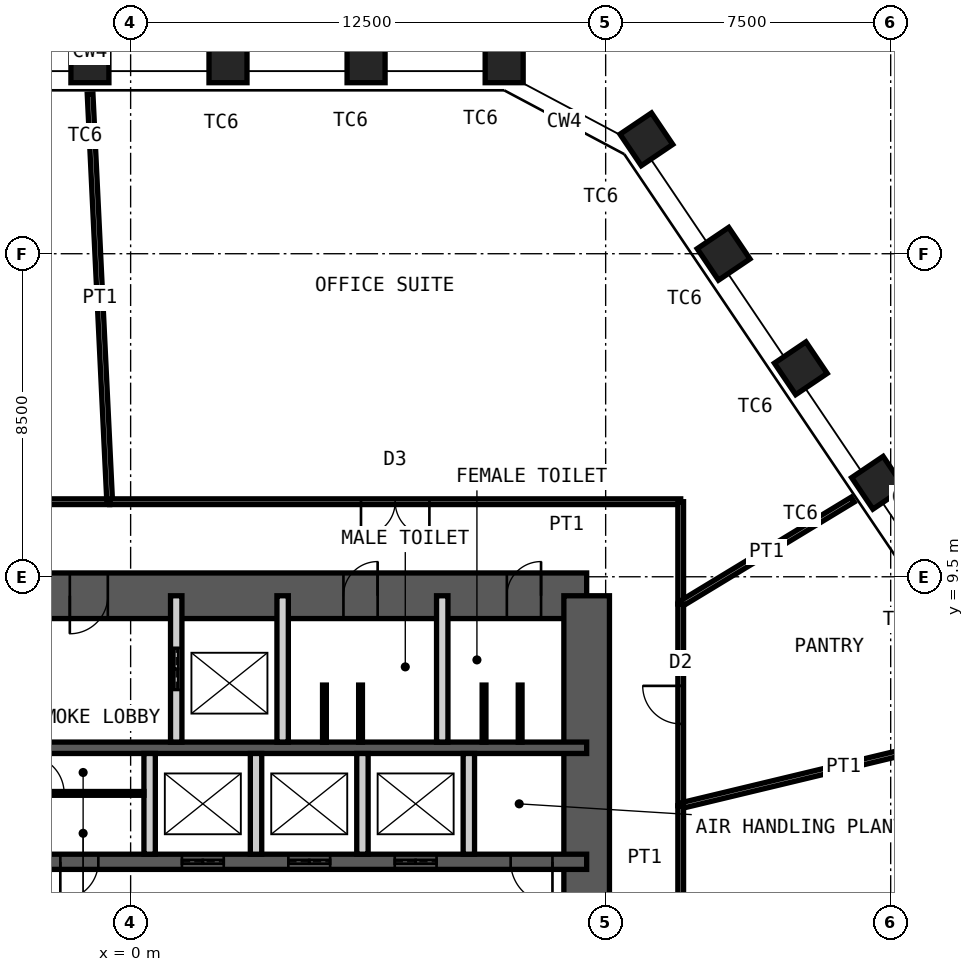
"""IFC4 building model, lengths in metres.
Left out: names, types, materials, properties, quantities, classifications, styles, units other than length and angle.
Written with IfcOpenShell. Run it as: python <this file> out.ifc"""

import sys

from ifc_helpers import new_model, si_unit, direction, frame, frame_2d, origin, origin_2d, place, context, subcontext, project, spatial, rectangle, hollow_rectangle, extrude, element, fill, save


model = new_model("IFC4")
c1 = context("Model", 3, precision=1e-05, world=origin(), true_north=direction((0.0, 1.0)))
c2 = subcontext(c1, "Body", "Model", "MODEL_VIEW")
j1 = project(units=[si_unit("LENGTHUNIT", "METRE"), si_unit("PLANEANGLEUNIT", "RADIAN")], contexts=[c1])
p1 = place(None, origin())
s1 = spatial("IfcSite", under=j1, at=p1, CompositionType="ELEMENT")
p2 = place(p1, origin())
s2 = spatial("IfcBuilding", under=s1, at=p2, CompositionType="ELEMENT")
p3 = place(p2, frame((0.0, 0.0, 226.6)))
s3 = spatial("IfcBuildingStorey", under=s2, at=p3, CompositionType="ELEMENT", Elevation=226.6)
for number, where, z_axis, x_axis in (
    (1, (-1.071, 23.0, 0.0), (0.0, 0.0, 1.0), (-1.0, 0.0, 0.0)),
    (2, (2.562, 23.0, 0.0), (0.0, 0.0, 1.0), (-1.0, 0.0, 0.0)),
    (3, (6.196, 23.0, 0.0), (0.0, 0.0, 1.0), (-1.0, 0.0, 0.0)),
    (4, (9.829, 23.0, 0.0), (0.0, 0.0, 1.0), (-1.0, 0.0, 0.0)),
    (5, (13.571, 21.01, 0.0), (0.0, 0.0, 1.0), (-0.559, 0.829, 0.0)),
    (6, (15.603, 17.998, 0.0), (0.0, 0.0, 1.0), (-0.559, 0.829, 0.0)),
    (7, (17.635, 14.986, 0.0), (0.0, 0.0, 1.0), (-0.559, 0.829, 0.0)),
    (8, (19.667, 11.973, 0.0), (0.0, 0.0, 1.0), (-0.559, 0.829, 0.0)),
):
    element("IfcColumn", number, at=place(p3, frame(where, z_axis=z_axis, x_axis=x_axis)), inside=s3, PredefinedType="COLUMN", context=c2, shape_type="SweptSolid", body=[
        extrude(hollow_rectangle(XDim=1.0, YDim=1.0, WallThickness=0.06, at=origin_2d()), origin(), (0.0, 0.0, 1.0), 4.2),
    ])
p4 = place(p3, frame((-12.0, 9.0, 0.0), z_axis=(0.0, 0.0, 1.0), x_axis=(1.0, 0.0, 0.0)))
e9 = element("IfcWall", 9, at=p4, inside=s3, PredefinedType="SHEAR", context=c2, shape_type="SweptSolid", body=[
    extrude(rectangle(XDim=24.0, YDim=1.2, at=frame_2d((12.0, 0.0))), origin(), (0.0, 0.0, 1.0), 4.2),
])
p5 = place(p4, frame((10.4, 0.0, 0.0)))
e10 = element("IfcOpeningElement", 10, at=p5, cuts=e9, PredefinedType="OPENING", context=c2, shape_type="SweptSolid", body=[
    extrude(rectangle(XDim=1.0, YDim=2.1, at=frame_2d((0.5, 1.05))), frame((0.0, 0.61, 0.0), z_axis=(0.0, -1.0, 0.0), x_axis=(1.0, 0.0, 0.0)), (0.0, 0.0, 1.0), 1.22),
])
p6 = place(p4, frame((17.6, 0.0, 0.0)))
e11 = element("IfcOpeningElement", 11, at=p6, cuts=e9, PredefinedType="OPENING", context=c2, shape_type="SweptSolid", body=[
    extrude(rectangle(XDim=0.9, YDim=2.1, at=frame_2d((0.45, 1.05))), frame((0.0, 0.61, 0.0), z_axis=(0.0, -1.0, 0.0), x_axis=(1.0, 0.0, 0.0)), (0.0, 0.0, 1.0), 1.22),
])
p7 = place(p4, frame((21.9, 0.0, 0.0)))
e12 = element("IfcOpeningElement", 12, at=p7, cuts=e9, PredefinedType="OPENING", context=c2, shape_type="SweptSolid", body=[
    extrude(rectangle(XDim=0.9, YDim=2.1, at=frame_2d((0.45, 1.05))), frame((0.0, 0.61, 0.0), z_axis=(0.0, -1.0, 0.0), x_axis=(1.0, 0.0, 0.0)), (0.0, 0.0, 1.0), 1.22),
])
p8 = place(p3, frame((12.0, -9.0, 0.0), z_axis=(0.0, 0.0, 1.0), x_axis=(0.0, 1.0, 0.0)))
e13 = element("IfcWall", 13, at=p8, inside=s3, PredefinedType="SHEAR", context=c2, shape_type="SweptSolid", body=[
    extrude(rectangle(XDim=18.0, YDim=1.2, at=frame_2d((9.0, 0.0))), origin(), (0.0, 0.0, 1.0), 4.2),
])
p9 = place(p8, frame((8.1, 0.0, 0.0)))
e14 = element("IfcOpeningElement", 14, at=p9, cuts=e13, PredefinedType="OPENING", context=c2, shape_type="SweptSolid", body=[
    extrude(rectangle(XDim=1.8, YDim=2.1, at=frame_2d((0.9, 1.05))), frame((0.0, 0.61, 0.0), z_axis=(0.0, -1.0, 0.0), x_axis=(1.0, 0.0, 0.0)), (0.0, 0.0, 1.0), 1.22),
])
p10 = place(p3, frame((-12.0, 5.0, 0.0), z_axis=(0.0, 0.0, 1.0), x_axis=(1.0, 0.0, 0.0)))
e15 = element("IfcWall", 15, at=p10, inside=s3, PredefinedType="SHEAR", context=c2, shape_type="SweptSolid", body=[
    extrude(rectangle(XDim=24.0, YDim=0.3, at=frame_2d((12.0, 0.0))), origin(), (0.0, 0.0, 1.0), 4.2),
])
p11 = place(p3, frame((-12.0, 2.0, 0.0), z_axis=(0.0, 0.0, 1.0), x_axis=(1.0, 0.0, 0.0)))
e16 = element("IfcWall", 16, at=p11, inside=s3, PredefinedType="SHEAR", context=c2, shape_type="SweptSolid", body=[
    extrude(rectangle(XDim=24.0, YDim=0.4, at=frame_2d((12.0, 0.0))), origin(), (0.0, 0.0, 1.0), 4.2),
])
p12 = place(p11, frame((2.4, 0.0, 0.0)))
e17 = element("IfcOpeningElement", 17, at=p12, cuts=e16, PredefinedType="OPENING", context=c2, shape_type="SweptSolid", body=[
    extrude(rectangle(XDim=1.1, YDim=2.1, at=frame_2d((0.55, 1.05))), frame((0.0, 0.21, 0.0), z_axis=(0.0, -1.0, 0.0), x_axis=(1.0, 0.0, 0.0)), (0.0, 0.0, 1.0), 0.42),
])
p13 = place(p11, frame((22.0, 0.0, 0.0)))
e18 = element("IfcOpeningElement", 18, at=p13, cuts=e16, PredefinedType="OPENING", context=c2, shape_type="SweptSolid", body=[
    extrude(rectangle(XDim=1.1, YDim=2.1, at=frame_2d((0.55, 1.05))), frame((0.0, 0.21, 0.0), z_axis=(0.0, -1.0, 0.0), x_axis=(1.0, 0.0, 0.0)), (0.0, 0.0, 1.0), 0.42),
])
p14 = place(p11, frame((10.15, 0.0, 0.0)))
e19 = element("IfcOpeningElement", 19, at=p14, cuts=e16, PredefinedType="OPENING", context=c2, shape_type="SweptSolid", body=[
    extrude(rectangle(XDim=1.0, YDim=2.1, at=frame_2d((0.5, 1.05))), frame((0.0, 0.21, 0.0), z_axis=(0.0, -1.0, 0.0), x_axis=(1.0, 0.0, 0.0)), (0.0, 0.0, 1.0), 0.42),
])
p15 = place(p11, frame((6.9, 0.0, 0.0)))
e20 = element("IfcOpeningElement", 20, at=p15, cuts=e16, PredefinedType="OPENING", context=c2, shape_type="SweptSolid", body=[
    extrude(rectangle(XDim=1.0, YDim=2.1, at=frame_2d((0.5, 1.05))), frame((0.0, 0.21, 0.0), z_axis=(0.0, -1.0, 0.0), x_axis=(1.0, 0.0, 0.0)), (0.0, 0.0, 1.0), 0.42),
])
p16 = place(p11, frame((13.35, 0.0, 0.0)))
e21 = element("IfcOpeningElement", 21, at=p16, cuts=e16, PredefinedType="OPENING", context=c2, shape_type="SweptSolid", body=[
    extrude(rectangle(XDim=1.1, YDim=2.4, at=frame_2d((0.55, 1.2))), frame((0.0, 0.21, 0.0), z_axis=(0.0, -1.0, 0.0), x_axis=(1.0, 0.0, 0.0)), (0.0, 0.0, 1.0), 0.42),
])
p17 = place(p11, frame((16.15, 0.0, 0.0)))
e22 = element("IfcOpeningElement", 22, at=p17, cuts=e16, PredefinedType="OPENING", context=c2, shape_type="SweptSolid", body=[
    extrude(rectangle(XDim=1.1, YDim=2.4, at=frame_2d((0.55, 1.2))), frame((0.0, 0.21, 0.0), z_axis=(0.0, -1.0, 0.0), x_axis=(1.0, 0.0, 0.0)), (0.0, 0.0, 1.0), 0.42),
])
p18 = place(p11, frame((18.95, 0.0, 0.0)))
e23 = element("IfcOpeningElement", 23, at=p18, cuts=e16, PredefinedType="OPENING", context=c2, shape_type="SweptSolid", body=[
    extrude(rectangle(XDim=1.1, YDim=2.4, at=frame_2d((0.55, 1.2))), frame((0.0, 0.21, 0.0), z_axis=(0.0, -1.0, 0.0), x_axis=(1.0, 0.0, 0.0)), (0.0, 0.0, 1.0), 0.42),
])
p19 = place(p3, frame((1.2, 5.15, 0.0), z_axis=(0.0, 0.0, 1.0), x_axis=(0.0, 1.0, 0.0)))
e24 = element("IfcWall", 24, at=p19, inside=s3, PredefinedType="PARTITIONING", context=c2, shape_type="SweptSolid", body=[
    extrude(rectangle(XDim=3.85, YDim=0.3, at=frame_2d((1.925, 0.0))), origin(), (0.0, 0.0, 1.0), 3.98),
])
p20 = place(p19, frame((1.375, 0.0, 0.0)))
e25 = element("IfcOpeningElement", 25, at=p20, cuts=e24, PredefinedType="OPENING", context=c2, shape_type="SweptSolid", body=[
    extrude(rectangle(XDim=1.1, YDim=2.4, at=frame_2d((0.55, 1.2))), frame((0.0, 0.16, 0.0), z_axis=(0.0, -1.0, 0.0), x_axis=(1.0, 0.0, 0.0)), (0.0, 0.0, 1.0), 0.32),
])
for number, where, z_axis, x_axis in (
    (26, (4.0, 5.15, 0.0), (0.0, 0.0, 1.0), (0.0, 1.0, 0.0)),
    (27, (8.2, 5.15, 0.0), (0.0, 0.0, 1.0), (0.0, 1.0, 0.0)),
):
    element("IfcWall", number, at=place(p3, frame(where, z_axis=z_axis, x_axis=x_axis)), inside=s3, PredefinedType="PARTITIONING", context=c2, shape_type="SweptSolid", body=[
        extrude(rectangle(XDim=3.85, YDim=0.3, at=frame_2d((1.925, 0.0))), origin(), (0.0, 0.0, 1.0), 3.98),
    ])
for number, where, z_axis, x_axis in (
    (28, (0.5, 2.2, 0.0), (0.0, 0.0, 1.0), (0.0, 1.0, 0.0)),
    (29, (3.3, 2.2, 0.0), (0.0, 0.0, 1.0), (0.0, 1.0, 0.0)),
    (30, (6.1, 2.2, 0.0), (0.0, 0.0, 1.0), (0.0, 1.0, 0.0)),
    (31, (8.9, 2.2, 0.0), (0.0, 0.0, 1.0), (0.0, 1.0, 0.0)),
):
    element("IfcWall", number, at=place(p3, frame(where, z_axis=z_axis, x_axis=x_axis)), inside=s3, PredefinedType="PARTITIONING", context=c2, shape_type="SweptSolid", body=[
        extrude(rectangle(XDim=2.65, YDim=0.3, at=frame_2d((1.325, 0.0))), origin(), (0.0, 0.0, 1.0), 3.98),
    ])
p21 = place(p3, frame((-2.85, 3.8, 0.0), z_axis=(0.0, 0.0, 1.0), x_axis=(1.0, 0.0, 0.0)))
e32 = element("IfcWall", 32, at=p21, inside=s3, PredefinedType="PARTITIONING", context=c2, shape_type="SweptSolid", body=[
    extrude(rectangle(XDim=3.2, YDim=0.1, at=frame_2d((1.6, 0.0))), origin(), (0.0, 0.0, 1.0), 3.98),
])
p22 = place(p21, frame((0.1, 0.0, 0.0)))
e33 = element("IfcOpeningElement", 33, at=p22, cuts=e32, PredefinedType="OPENING", context=c2, shape_type="SweptSolid", body=[
    extrude(rectangle(XDim=1.0, YDim=2.4, at=frame_2d((0.5, 1.2))), frame((0.0, 0.06, 0.0), z_axis=(0.0, -1.0, 0.0), x_axis=(1.0, 0.0, 0.0)), (0.0, 0.0, 1.0), 0.12),
])
for number, where, z_axis, x_axis in (
    (34, (5.1, 5.15, 0.0), (0.0, 0.0, 1.0), (0.0, 1.0, 0.0)),
    (35, (6.05, 5.15, 0.0), (0.0, 0.0, 1.0), (0.0, 1.0, 0.0)),
    (36, (9.3, 5.15, 0.0), (0.0, 0.0, 1.0), (0.0, 1.0, 0.0)),
    (37, (10.25, 5.15, 0.0), (0.0, 0.0, 1.0), (0.0, 1.0, 0.0)),
):
    element("IfcWall", number, at=place(p3, frame(where, z_axis=z_axis, x_axis=x_axis)), inside=s3, PredefinedType="PARTITIONING", context=c2, shape_type="SweptSolid", body=[
        extrude(rectangle(XDim=1.5, YDim=0.1, at=frame_2d((0.75, 0.0))), origin(), (0.0, 0.0, 1.0), 2.1),
    ])
p23 = place(p3, frame((-8.267, 11.475, 0.0), z_axis=(0.0, 0.0, 1.0), x_axis=(1.0, 0.0, 0.0)))
e38 = element("IfcWall", 38, at=p23, inside=s3, PredefinedType="PARTITIONING", context=c2, shape_type="SweptSolid", body=[
    extrude(rectangle(XDim=7.716, YDim=0.15, at=frame_2d((3.858, 0.0))), origin(), (0.0, 0.0, 1.0), 4.03),
])
p24 = place(p23, frame((2.958, 0.0, 0.0)))
e39 = element("IfcOpeningElement", 39, at=p24, cuts=e38, PredefinedType="OPENING", context=c2, shape_type="SweptSolid", body=[
    extrude(rectangle(XDim=1.8, YDim=2.4, at=frame_2d((0.9, 1.2))), frame((0.0, 0.085, 0.0), z_axis=(0.0, -1.0, 0.0), x_axis=(1.0, 0.0, 0.0)), (0.0, 0.0, 1.0), 0.17),
])
p25 = place(p3, frame((-1.067, 22.2, 0.0), z_axis=(0.0, 0.0, 1.0), x_axis=(0.047998335863, -0.998847415652, 0.0)))
e40 = element("IfcWall", 40, at=p25, inside=s3, PredefinedType="PARTITIONING", context=c2, shape_type="SweptSolid", body=[
    extrude(rectangle(XDim=10.738, YDim=0.15, at=frame_2d((5.369, 0.0))), origin(), (0.0, 0.0, 1.0), 3.43),
])
p26 = place(p3, frame((-0.551, 11.475, 0.0), z_axis=(0.0, 0.0, 1.0), x_axis=(1.0, 0.0, 0.0)))
e41 = element("IfcWall", 41, at=p26, inside=s3, PredefinedType="PARTITIONING", context=c2, shape_type="SweptSolid", body=[
    extrude(rectangle(XDim=15.026, YDim=0.15, at=frame_2d((7.513, 0.0))), origin(), (0.0, 0.0, 1.0), 4.03),
])
p27 = place(p26, frame((6.613, 0.0, 0.0)))
e42 = element("IfcOpeningElement", 42, at=p27, cuts=e41, PredefinedType="OPENING", context=c2, shape_type="SweptSolid", body=[
    extrude(rectangle(XDim=1.8, YDim=2.4, at=frame_2d((0.9, 1.2))), frame((0.0, 0.085, 0.0), z_axis=(0.0, -1.0, 0.0), x_axis=(1.0, 0.0, 0.0)), (0.0, 0.0, 1.0), 0.17),
])
p28 = place(p3, frame((14.475, 11.475, 0.0), z_axis=(0.0, 0.0, 1.0), x_axis=(0.0, -1.0, 0.0)))
e43 = element("IfcWall", 43, at=p28, inside=s3, PredefinedType="PARTITIONING", context=c2, shape_type="SweptSolid", body=[
    extrude(rectangle(XDim=2.692, YDim=0.15, at=frame_2d((1.346, 0.0))), origin(), (0.0, 0.0, 1.0), 4.03),
])
p29 = place(p3, frame((19.001, 11.53, 0.0), z_axis=(0.0, 0.0, 1.0), x_axis=(-0.854906581035, -0.518781975114, 0.0)))
e44 = element("IfcWall", 44, at=p29, inside=s3, PredefinedType="PARTITIONING", context=c2, shape_type="SweptSolid", body=[
    extrude(rectangle(XDim=5.294, YDim=0.15, at=frame_2d((2.647, 0.0))), origin(), (0.0, 0.0, 1.0), 3.43),
])
p30 = place(p3, frame((14.475, 8.783, 0.0), z_axis=(0.0, 0.0, 1.0), x_axis=(0.0, -1.0, 0.0)))
e45 = element("IfcWall", 45, at=p30, inside=s3, PredefinedType="PARTITIONING", context=c2, shape_type="SweptSolid", body=[
    extrude(rectangle(XDim=5.309, YDim=0.15, at=frame_2d((2.654, 0.0))), origin(), (0.0, 0.0, 1.0), 4.03),
])
p31 = place(p30, frame((2.154, 0.0, 0.0)))
e46 = element("IfcOpeningElement", 46, at=p31, cuts=e45, PredefinedType="OPENING", context=c2, shape_type="SweptSolid", body=[
    extrude(rectangle(XDim=1.0, YDim=2.4, at=frame_2d((0.5, 1.2))), frame((0.0, 0.085, 0.0), z_axis=(0.0, -1.0, 0.0), x_axis=(1.0, 0.0, 0.0)), (0.0, 0.0, 1.0), 0.17),
])
p32 = place(p3, frame((23.053, 5.534, 0.0), z_axis=(0.0, 0.0, 1.0), x_axis=(-0.972377252501, -0.233414821335, 0.0)))
e47 = element("IfcWall", 47, at=p32, inside=s3, PredefinedType="PARTITIONING", context=c2, shape_type="SweptSolid", body=[
    extrude(rectangle(XDim=8.822, YDim=0.15, at=frame_2d((4.411, 0.0))), origin(), (0.0, 0.0, 1.0), 3.43),
])
p33 = place(p3, frame((14.475, 3.475, 0.0), z_axis=(0.0, 0.0, 1.0), x_axis=(0.0, -1.0, 0.0)))
e48 = element("IfcWall", 48, at=p33, inside=s3, PredefinedType="PARTITIONING", context=c2, shape_type="SweptSolid", body=[
    extrude(rectangle(XDim=5.896, YDim=0.15, at=frame_2d((2.948, 0.0))), origin(), (0.0, 0.0, 1.0), 4.03),
])
p34 = place(p33, frame((2.448, 0.0, 0.0)))
e49 = element("IfcOpeningElement", 49, at=p34, cuts=e48, PredefinedType="OPENING", context=c2, shape_type="SweptSolid", body=[
    extrude(rectangle(XDim=1.0, YDim=2.4, at=frame_2d((0.5, 1.2))), frame((0.0, 0.085, 0.0), z_axis=(0.0, -1.0, 0.0), x_axis=(1.0, 0.0, 0.0)), (0.0, 0.0, 1.0), 0.17),
])
p35 = place(p5, origin())
e50 = element("IfcDoor", 50, at=p35, inside=s3, OperationType="SINGLE_SWING_LEFT", PredefinedType="DOOR", context=c2, shape_type="SweptSolid", body=[
    extrude(rectangle(XDim=1.0, YDim=2.1, at=frame_2d((0.5, 1.05))), frame((0.0, 0.025, 0.0), z_axis=(0.0, -1.0, 0.0), x_axis=(1.0, 0.0, 0.0)), (0.0, 0.0, 1.0), 0.05),
])
fill(e10, e50)
p36 = place(p6, origin())
e51 = element("IfcDoor", 51, at=p36, inside=s3, OperationType="SINGLE_SWING_LEFT", PredefinedType="DOOR", context=c2, shape_type="SweptSolid", body=[
    extrude(rectangle(XDim=0.9, YDim=2.1, at=frame_2d((0.45, 1.05))), frame((0.0, 0.025, 0.0), z_axis=(0.0, -1.0, 0.0), x_axis=(1.0, 0.0, 0.0)), (0.0, 0.0, 1.0), 0.05),
])
fill(e11, e51)
p37 = place(p7, origin())
e52 = element("IfcDoor", 52, at=p37, inside=s3, OperationType="SINGLE_SWING_LEFT", PredefinedType="DOOR", context=c2, shape_type="SweptSolid", body=[
    extrude(rectangle(XDim=0.9, YDim=2.1, at=frame_2d((0.45, 1.05))), frame((0.0, 0.025, 0.0), z_axis=(0.0, -1.0, 0.0), x_axis=(1.0, 0.0, 0.0)), (0.0, 0.0, 1.0), 0.05),
])
fill(e12, e52)
p38 = place(p13, origin())
e53 = element("IfcDoor", 53, at=p38, inside=s3, OperationType="SINGLE_SWING_RIGHT", PredefinedType="DOOR", context=c2, shape_type="SweptSolid", body=[
    extrude(rectangle(XDim=1.1, YDim=2.1, at=frame_2d((0.55, 1.05))), frame((0.0, 0.025, 0.0), z_axis=(0.0, -1.0, 0.0), x_axis=(1.0, 0.0, 0.0)), (0.0, 0.0, 1.0), 0.05),
])
fill(e18, e53)
p39 = place(p14, origin())
e54 = element("IfcDoor", 54, at=p39, inside=s3, OperationType="SINGLE_SWING_LEFT", PredefinedType="DOOR", context=c2, shape_type="SweptSolid", body=[
    extrude(rectangle(XDim=1.0, YDim=2.1, at=frame_2d((0.5, 1.05))), frame((0.0, 0.025, 0.0), z_axis=(0.0, -1.0, 0.0), x_axis=(1.0, 0.0, 0.0)), (0.0, 0.0, 1.0), 0.05),
])
fill(e19, e54)
p40 = place(p20, origin())
e55 = element("IfcDoor", 55, at=p40, inside=s3, OperationType="DOUBLE_DOOR_SLIDING", PredefinedType="DOOR", context=c2, shape_type="SweptSolid", body=[
    extrude(rectangle(XDim=1.1, YDim=2.4, at=frame_2d((0.55, 1.2))), frame((0.0, 0.025, 0.0), z_axis=(0.0, -1.0, 0.0), x_axis=(1.0, 0.0, 0.0)), (0.0, 0.0, 1.0), 0.05),
])
fill(e25, e55)
p41 = place(p16, origin())
e56 = element("IfcDoor", 56, at=p41, inside=s3, OperationType="DOUBLE_DOOR_SLIDING", PredefinedType="DOOR", context=c2, shape_type="SweptSolid", body=[
    extrude(rectangle(XDim=1.1, YDim=2.4, at=frame_2d((0.55, 1.2))), frame((0.0, 0.025, 0.0), z_axis=(0.0, -1.0, 0.0), x_axis=(1.0, 0.0, 0.0)), (0.0, 0.0, 1.0), 0.05),
])
fill(e21, e56)
p42 = place(p17, origin())
e57 = element("IfcDoor", 57, at=p42, inside=s3, OperationType="DOUBLE_DOOR_SLIDING", PredefinedType="DOOR", context=c2, shape_type="SweptSolid", body=[
    extrude(rectangle(XDim=1.1, YDim=2.4, at=frame_2d((0.55, 1.2))), frame((0.0, 0.025, 0.0), z_axis=(0.0, -1.0, 0.0), x_axis=(1.0, 0.0, 0.0)), (0.0, 0.0, 1.0), 0.05),
])
fill(e22, e57)
p43 = place(p18, origin())
e58 = element("IfcDoor", 58, at=p43, inside=s3, OperationType="DOUBLE_DOOR_SLIDING", PredefinedType="DOOR", context=c2, shape_type="SweptSolid", body=[
    extrude(rectangle(XDim=1.1, YDim=2.4, at=frame_2d((0.55, 1.2))), frame((0.0, 0.025, 0.0), z_axis=(0.0, -1.0, 0.0), x_axis=(1.0, 0.0, 0.0)), (0.0, 0.0, 1.0), 0.05),
])
fill(e23, e58)
p44 = place(p22, origin())
e59 = element("IfcDoor", 59, at=p44, inside=s3, OperationType="SINGLE_SWING_RIGHT", PredefinedType="DOOR", context=c2, shape_type="SweptSolid", body=[
    extrude(rectangle(XDim=1.0, YDim=2.4, at=frame_2d((0.5, 1.2))), frame((0.0, 0.025, 0.0), z_axis=(0.0, -1.0, 0.0), x_axis=(1.0, 0.0, 0.0)), (0.0, 0.0, 1.0), 0.05),
])
fill(e33, e59)
p45 = place(p27, origin())
e60 = element("IfcDoor", 60, at=p45, inside=s3, OperationType="DOUBLE_DOOR_DOUBLE_SWING", PredefinedType="DOOR", context=c2, shape_type="SweptSolid", body=[
    extrude(rectangle(XDim=1.8, YDim=2.4, at=frame_2d((0.9, 1.2))), frame((0.0, 0.025, 0.0), z_axis=(0.0, -1.0, 0.0), x_axis=(1.0, 0.0, 0.0)), (0.0, 0.0, 1.0), 0.05),
])
fill(e42, e60)
p46 = place(p31, origin())
e61 = element("IfcDoor", 61, at=p46, inside=s3, OperationType="SINGLE_SWING_LEFT", PredefinedType="DOOR", context=c2, shape_type="SweptSolid", body=[
    extrude(rectangle(XDim=1.0, YDim=2.4, at=frame_2d((0.5, 1.2))), frame((0.0, 0.025, 0.0), z_axis=(0.0, -1.0, 0.0), x_axis=(1.0, 0.0, 0.0)), (0.0, 0.0, 1.0), 0.05),
])
fill(e46, e61)
save(model, sys.argv[1])
